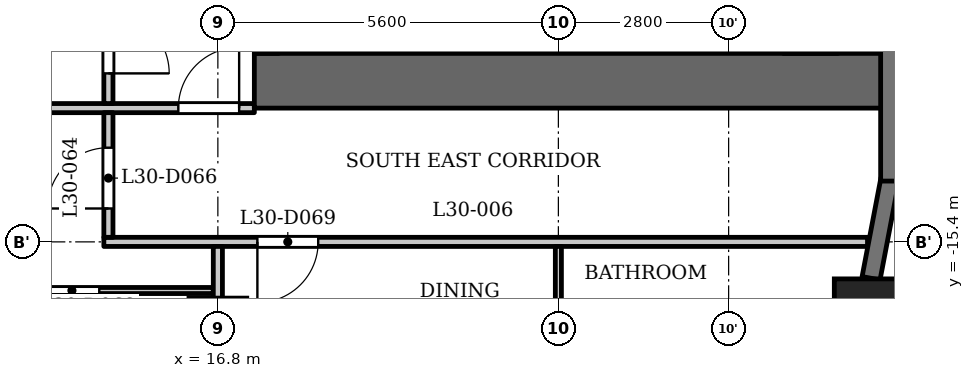
"""IFC4 building model, lengths in metres.
Left out: names, types, materials, properties, quantities, classifications, styles, units other than length and angle.
Written with IfcOpenShell. Run it as: python <this file> out.ifc"""

import sys

from ifc_helpers import new_model, si_unit, direction, frame, frame_2d, origin, origin_2d, place, context, subcontext, project, spatial, rectangle, extrude, element, fill, save


model = new_model("IFC4")
c1 = context("Model", 3, precision=1e-05, world=origin(), true_north=direction((0.0, 1.0)))
c2 = subcontext(c1, "Body", "Model", "MODEL_VIEW")
j1 = project(units=[si_unit("LENGTHUNIT", "METRE"), si_unit("PLANEANGLEUNIT", "RADIAN")], contexts=[c1])
p1 = place(None, origin())
s1 = spatial("IfcSite", under=j1, at=p1, CompositionType="ELEMENT")
p2 = place(p1, origin())
s2 = spatial("IfcBuilding", under=s1, at=p2, CompositionType="ELEMENT")
p3 = place(p2, frame((0.0, 0.0, 118.3)))
s3 = spatial("IfcBuildingStorey", under=s2, at=p3, CompositionType="ELEMENT", Elevation=118.3)
p4 = place(p3, frame((27.538, -16.609, 0.0), z_axis=(0.0, 0.0, 1.0), x_axis=(1.0, 0.0, 0.0)))
e1 = element("IfcColumn", 1, at=p4, inside=s3, PredefinedType="COLUMN", context=c2, shape_type="SweptSolid", body=[
    extrude(rectangle(XDim=1.2, YDim=1.2, at=origin_2d()), origin(), (0.0, 0.0, 1.0), 3.5),
])
p5 = place(p3, frame((16.8, -16.8, 0.0), z_axis=(0.0, 0.0, 1.0), x_axis=(1.0, 0.0, 0.0)))
e2 = element("IfcColumn", 2, at=p5, inside=s3, PredefinedType="COLUMN", context=c2, shape_type="SweptSolid", body=[
    extrude(rectangle(XDim=0.95, YDim=0.95, at=origin_2d()), origin(), (0.0, 0.0, 1.0), 3.5),
])
p6 = place(p3, frame((27.542, -15.999, 0.0), z_axis=(0.0, 0.0, 1.0), x_axis=(0.187349172861, 0.982293381546, 0.0)))
e3 = element("IfcWall", 3, at=p6, inside=s3, PredefinedType="SOLIDWALL", context=c2, shape_type="SweptSolid", body=[
    extrude(rectangle(XDim=1.656, YDim=0.3, at=frame_2d((0.828, 0.0))), origin(), (0.0, 0.0, 1.0), 2.4),
])
p7 = place(p3, frame((27.85, -14.4, 0.0), z_axis=(0.0, 0.0, 1.0), x_axis=(0.0, 1.0, 0.0)))
e4 = element("IfcWall", 4, at=p7, inside=s3, PredefinedType="SOLIDWALL", context=c2, shape_type="SweptSolid", body=[
    extrude(rectangle(XDim=2.6, YDim=0.3, at=frame_2d((1.3, 0.0))), origin(), (0.0, 0.0, 1.0), 2.4),
])
p8 = place(p3, frame((17.4, -12.75, 0.0), z_axis=(0.0, 0.0, 1.0), x_axis=(1.0, 0.0, 0.0)))
e5 = element("IfcWall", 5, at=p8, inside=s3, PredefinedType="SHEAR", context=c2, shape_type="SweptSolid", body=[
    extrude(rectangle(XDim=10.4, YDim=0.9, at=frame_2d((5.2, 0.0))), origin(), (0.0, 0.0, 1.0), 3.2),
])
p9 = place(p3, frame((17.6, -12.3, 0.0), z_axis=(0.0, 0.0, 1.0), x_axis=(0.0, 1.0, 0.0)))
e6 = element("IfcWall", 6, at=p9, inside=s3, PredefinedType="SHEAR", context=c2, shape_type="SweptSolid", body=[
    extrude(rectangle(XDim=24.6, YDim=0.4, at=frame_2d((12.3, 0.0))), origin(), (0.0, 0.0, 1.0), 3.2),
])
p10 = place(p9, frame((6.0, 0.0, 0.0)))
e7 = element("IfcOpeningElement", 7, at=p10, cuts=e6, PredefinedType="OPENING", context=c2, shape_type="SweptSolid", body=[
    extrude(rectangle(XDim=1.1, YDim=2.1, at=frame_2d((0.55, 1.05))), frame((0.0, 0.21, 0.0), z_axis=(0.0, -1.0, 0.0), x_axis=(1.0, 0.0, 0.0)), (0.0, 0.0, 1.0), 0.42),
])
p11 = place(p9, frame((8.4, 0.0, 0.0)))
e8 = element("IfcOpeningElement", 8, at=p11, cuts=e6, PredefinedType="OPENING", context=c2, shape_type="SweptSolid", body=[
    extrude(rectangle(XDim=1.1, YDim=2.1, at=frame_2d((0.55, 1.05))), frame((0.0, 0.21, 0.0), z_axis=(0.0, -1.0, 0.0), x_axis=(1.0, 0.0, 0.0)), (0.0, 0.0, 1.0), 0.42),
])
p12 = place(p9, frame((10.8, 0.0, 0.0)))
e9 = element("IfcOpeningElement", 9, at=p12, cuts=e6, PredefinedType="OPENING", context=c2, shape_type="SweptSolid", body=[
    extrude(rectangle(XDim=1.1, YDim=2.1, at=frame_2d((0.55, 1.05))), frame((0.0, 0.21, 0.0), z_axis=(0.0, -1.0, 0.0), x_axis=(1.0, 0.0, 0.0)), (0.0, 0.0, 1.0), 0.42),
])
p13 = place(p9, frame((16.75, 0.0, 0.0)))
e10 = element("IfcOpeningElement", 10, at=p13, cuts=e6, PredefinedType="OPENING", context=c2, shape_type="SweptSolid", body=[
    extrude(rectangle(XDim=0.9, YDim=2.1, at=frame_2d((0.45, 1.05))), frame((0.0, 0.21, 0.0), z_axis=(0.0, -1.0, 0.0), x_axis=(1.0, 0.0, 0.0)), (0.0, 0.0, 1.0), 0.42),
])
p14 = place(p9, frame((22.8, 0.0, 0.0)))
e11 = element("IfcOpeningElement", 11, at=p14, cuts=e6, PredefinedType="OPENING", context=c2, shape_type="SweptSolid", body=[
    extrude(rectangle(XDim=1.1, YDim=2.1, at=frame_2d((0.55, 1.05))), frame((0.0, 0.21, 0.0), z_axis=(0.0, -1.0, 0.0), x_axis=(1.0, 0.0, 0.0)), (0.0, 0.0, 1.0), 0.42),
])
p15 = place(p9, frame((0.7, 0.0, 0.0)))
e12 = element("IfcOpeningElement", 12, at=p15, cuts=e6, PredefinedType="OPENING", context=c2, shape_type="SweptSolid", body=[
    extrude(rectangle(XDim=1.1, YDim=2.1, at=frame_2d((0.55, 1.05))), frame((0.0, 0.21, 0.0), z_axis=(0.0, -1.0, 0.0), x_axis=(1.0, 0.0, 0.0)), (0.0, 0.0, 1.0), 0.42),
])
p16 = place(p9, frame((12.775, 0.0, 0.0)))
e13 = element("IfcOpeningElement", 13, at=p16, cuts=e6, PredefinedType="OPENING", context=c2, shape_type="SweptSolid", body=[
    extrude(rectangle(XDim=1.8, YDim=2.1, at=frame_2d((0.9, 1.05))), frame((0.0, 0.21, 0.0), z_axis=(0.0, -1.0, 0.0), x_axis=(1.0, 0.0, 0.0)), (0.0, 0.0, 1.0), 0.42),
])
p17 = place(p3, frame((26.55, -12.3, 0.0), z_axis=(0.0, 0.0, 1.0), x_axis=(0.0, 1.0, 0.0)))
e14 = element("IfcWall", 14, at=p17, inside=s3, PredefinedType="SHEAR", context=c2, shape_type="SweptSolid", body=[
    extrude(rectangle(XDim=24.6, YDim=0.9, at=frame_2d((12.3, 0.0))), origin(), (0.0, 0.0, 1.0), 3.2),
])
p18 = place(p3, frame((23.55, -12.3, 0.0), z_axis=(0.0, 0.0, 1.0), x_axis=(0.0, 1.0, 0.0)))
e15 = element("IfcWall", 15, at=p18, inside=s3, PredefinedType="PARTITIONING", context=c2, shape_type="SweptSolid", body=[
    extrude(rectangle(XDim=2.5, YDim=0.2, at=frame_2d((1.25, 0.0))), origin(), (0.0, 0.0, 1.0), 3.2),
])
p19 = place(p18, frame((0.8, 0.0, 0.0)))
e16 = element("IfcOpeningElement", 16, at=p19, cuts=e15, PredefinedType="OPENING", context=c2, shape_type="SweptSolid", body=[
    extrude(rectangle(XDim=0.9, YDim=2.1, at=frame_2d((0.45, 1.05))), frame((0.0, 0.11, 0.0), z_axis=(0.0, -1.0, 0.0), x_axis=(1.0, 0.0, 0.0)), (0.0, 0.0, 1.0), 0.22),
])
p20 = place(p3, frame((-16.725, -16.2, 0.0), z_axis=(0.0, 0.0, 1.0), x_axis=(1.0, 0.0, 0.0)))
e17 = element("IfcWall", 17, at=p20, inside=s3, PredefinedType="PARTITIONING", context=c2, shape_type="SweptSolid", body=[
    extrude(rectangle(XDim=33.45, YDim=0.1, at=frame_2d((16.725, 0.0))), origin(), (0.0, 0.0, 1.0), 3.2),
])
p21 = place(p20, frame((4.075, 0.0, 0.0)))
e18 = element("IfcOpeningElement", 18, at=p21, cuts=e17, PredefinedType="OPENING", context=c2, shape_type="SweptSolid", body=[
    extrude(rectangle(XDim=0.8, YDim=2.1, at=frame_2d((0.4, 1.05))), frame((0.0, 0.06, 0.0), z_axis=(0.0, -1.0, 0.0), x_axis=(1.0, 0.0, 0.0)), (0.0, 0.0, 1.0), 0.12),
])
p22 = place(p20, frame((9.425, 0.0, 0.0)))
e19 = element("IfcOpeningElement", 19, at=p22, cuts=e17, PredefinedType="OPENING", context=c2, shape_type="SweptSolid", body=[
    extrude(rectangle(XDim=0.9, YDim=2.1, at=frame_2d((0.45, 1.05))), frame((0.0, 0.06, 0.0), z_axis=(0.0, -1.0, 0.0), x_axis=(1.0, 0.0, 0.0)), (0.0, 0.0, 1.0), 0.12),
])
p23 = place(p20, frame((19.875, 0.0, 0.0)))
e20 = element("IfcOpeningElement", 20, at=p23, cuts=e17, PredefinedType="OPENING", context=c2, shape_type="SweptSolid", body=[
    extrude(rectangle(XDim=0.8, YDim=2.1, at=frame_2d((0.4, 1.05))), frame((0.0, 0.06, 0.0), z_axis=(0.0, -1.0, 0.0), x_axis=(1.0, 0.0, 0.0)), (0.0, 0.0, 1.0), 0.12),
])
p24 = place(p20, frame((17.375, 0.0, 0.0)))
e21 = element("IfcOpeningElement", 21, at=p24, cuts=e17, PredefinedType="OPENING", context=c2, shape_type="SweptSolid", body=[
    extrude(rectangle(XDim=0.9, YDim=2.1, at=frame_2d((0.45, 1.05))), frame((0.0, 0.06, 0.0), z_axis=(0.0, -1.0, 0.0), x_axis=(1.0, 0.0, 0.0)), (0.0, 0.0, 1.0), 0.12),
])
p25 = place(p20, frame((12.525, 0.0, 0.0)))
e22 = element("IfcOpeningElement", 22, at=p25, cuts=e17, PredefinedType="OPENING", context=c2, shape_type="SweptSolid", body=[
    extrude(rectangle(XDim=0.9, YDim=2.1, at=frame_2d((0.45, 1.05))), frame((0.0, 0.06, 0.0), z_axis=(0.0, -1.0, 0.0), x_axis=(1.0, 0.0, 0.0)), (0.0, 0.0, 1.0), 0.12),
])
p26 = place(p20, frame((14.775, 0.0, 0.0)))
e23 = element("IfcOpeningElement", 23, at=p26, cuts=e17, PredefinedType="OPENING", context=c2, shape_type="SweptSolid", body=[
    extrude(rectangle(XDim=0.9, YDim=2.1, at=frame_2d((0.45, 1.05))), frame((0.0, 0.06, 0.0), z_axis=(0.0, -1.0, 0.0), x_axis=(1.0, 0.0, 0.0)), (0.0, 0.0, 1.0), 0.12),
])
p27 = place(p20, frame((26.475, 0.0, 0.0)))
e24 = element("IfcOpeningElement", 24, at=p27, cuts=e17, PredefinedType="OPENING", context=c2, shape_type="SweptSolid", body=[
    extrude(rectangle(XDim=0.8, YDim=2.1, at=frame_2d((0.4, 1.05))), frame((0.0, 0.06, 0.0), z_axis=(0.0, -1.0, 0.0), x_axis=(1.0, 0.0, 0.0)), (0.0, 0.0, 1.0), 0.12),
])
p28 = place(p20, frame((23.725, 0.0, 0.0)))
e25 = element("IfcOpeningElement", 25, at=p28, cuts=e17, PredefinedType="OPENING", context=c2, shape_type="SweptSolid", body=[
    extrude(rectangle(XDim=0.9, YDim=2.1, at=frame_2d((0.45, 1.05))), frame((0.0, 0.06, 0.0), z_axis=(0.0, -1.0, 0.0), x_axis=(1.0, 0.0, 0.0)), (0.0, 0.0, 1.0), 0.12),
])
p29 = place(p20, frame((29.075, 0.0, 0.0)))
e26 = element("IfcOpeningElement", 26, at=p29, cuts=e17, PredefinedType="OPENING", context=c2, shape_type="SweptSolid", body=[
    extrude(rectangle(XDim=0.8, YDim=2.1, at=frame_2d((0.4, 1.05))), frame((0.0, 0.06, 0.0), z_axis=(0.0, -1.0, 0.0), x_axis=(1.0, 0.0, 0.0)), (0.0, 0.0, 1.0), 0.12),
])
p30 = place(p20, frame((30.675, 0.0, 0.0)))
e27 = element("IfcOpeningElement", 27, at=p30, cuts=e17, PredefinedType="OPENING", context=c2, shape_type="SweptSolid", body=[
    extrude(rectangle(XDim=0.9, YDim=2.1, at=frame_2d((0.45, 1.05))), frame((0.0, 0.06, 0.0), z_axis=(0.0, -1.0, 0.0), x_axis=(1.0, 0.0, 0.0)), (0.0, 0.0, 1.0), 0.12),
])
p31 = place(p3, frame((14.925, -15.4, 0.0), z_axis=(0.0, 0.0, 1.0), x_axis=(1.0, 0.0, 0.0)))
e28 = element("IfcWall", 28, at=p31, inside=s3, PredefinedType="PARTITIONING", context=c2, shape_type="SweptSolid", body=[
    extrude(rectangle(XDim=12.559, YDim=0.15, at=frame_2d((6.279, 0.0))), origin(), (0.0, 0.0, 1.0), 3.2),
])
p32 = place(p31, frame((2.525, 0.0, 0.0)))
e29 = element("IfcOpeningElement", 29, at=p32, cuts=e28, PredefinedType="OPENING", context=c2, shape_type="SweptSolid", body=[
    extrude(rectangle(XDim=1.0, YDim=2.1, at=frame_2d((0.5, 1.05))), frame((0.0, 0.085, 0.0), z_axis=(0.0, -1.0, 0.0), x_axis=(1.0, 0.0, 0.0)), (0.0, 0.0, 1.0), 0.17),
])
p33 = place(p3, frame((-17.4, -13.2, 0.0), z_axis=(0.0, 0.0, 1.0), x_axis=(1.0, 0.0, 0.0)))
e30 = element("IfcWall", 30, at=p33, inside=s3, PredefinedType="PARTITIONING", context=c2, shape_type="SweptSolid", body=[
    extrude(rectangle(XDim=34.8, YDim=0.15, at=frame_2d((17.4, 0.0))), origin(), (0.0, 0.0, 1.0), 3.2),
])
p34 = place(p33, frame((0.15, 0.0, 0.0)))
e31 = element("IfcOpeningElement", 31, at=p34, cuts=e30, PredefinedType="OPENING", context=c2, shape_type="SweptSolid", body=[
    extrude(rectangle(XDim=1.0, YDim=2.1, at=frame_2d((0.5, 1.05))), frame((0.0, 0.085, 0.0), z_axis=(0.0, -1.0, 0.0), x_axis=(1.0, 0.0, 0.0)), (0.0, 0.0, 1.0), 0.17),
])
p35 = place(p33, frame((33.55, 0.0, 0.0)))
e32 = element("IfcOpeningElement", 32, at=p35, cuts=e30, PredefinedType="OPENING", context=c2, shape_type="SweptSolid", body=[
    extrude(rectangle(XDim=1.0, YDim=2.1, at=frame_2d((0.5, 1.05))), frame((0.0, 0.085, 0.0), z_axis=(0.0, -1.0, 0.0), x_axis=(1.0, 0.0, 0.0)), (0.0, 0.0, 1.0), 0.17),
])
p36 = place(p33, frame((10.1, 0.0, 0.0)))
e33 = element("IfcOpeningElement", 33, at=p36, cuts=e30, PredefinedType="OPENING", context=c2, shape_type="SweptSolid", body=[
    extrude(rectangle(XDim=1.0, YDim=2.1, at=frame_2d((0.5, 1.05))), frame((0.0, 0.085, 0.0), z_axis=(0.0, -1.0, 0.0), x_axis=(1.0, 0.0, 0.0)), (0.0, 0.0, 1.0), 0.17),
])
p37 = place(p33, frame((15.7, 0.0, 0.0)))
e34 = element("IfcOpeningElement", 34, at=p37, cuts=e30, PredefinedType="OPENING", context=c2, shape_type="SweptSolid", body=[
    extrude(rectangle(XDim=1.0, YDim=2.1, at=frame_2d((0.5, 1.05))), frame((0.0, 0.085, 0.0), z_axis=(0.0, -1.0, 0.0), x_axis=(1.0, 0.0, 0.0)), (0.0, 0.0, 1.0), 0.17),
])
p38 = place(p33, frame((24.9, 0.0, 0.0)))
e35 = element("IfcOpeningElement", 35, at=p38, cuts=e30, PredefinedType="OPENING", context=c2, shape_type="SweptSolid", body=[
    extrude(rectangle(XDim=1.0, YDim=2.1, at=frame_2d((0.5, 1.05))), frame((0.0, 0.085, 0.0), z_axis=(0.0, -1.0, 0.0), x_axis=(1.0, 0.0, 0.0)), (0.0, 0.0, 1.0), 0.17),
])
p39 = place(p3, frame((15.0, -15.325, 0.0), z_axis=(0.0, 0.0, 1.0), x_axis=(0.0, 1.0, 0.0)))
e36 = element("IfcWall", 36, at=p39, inside=s3, PredefinedType="PARTITIONING", context=c2, shape_type="SweptSolid", body=[
    extrude(rectangle(XDim=2.05, YDim=0.15, at=frame_2d((1.025, 0.0))), origin(), (0.0, 0.0, 1.0), 3.2),
])
p40 = place(p39, frame((0.474, 0.0, 0.0)))
e37 = element("IfcOpeningElement", 37, at=p40, cuts=e36, PredefinedType="OPENING", context=c2, shape_type="SweptSolid", body=[
    extrude(rectangle(XDim=1.0, YDim=2.1, at=frame_2d((0.5, 1.05))), frame((0.0, 0.085, 0.0), z_axis=(0.0, -1.0, 0.0), x_axis=(1.0, 0.0, 0.0)), (0.0, 0.0, 1.0), 0.17),
])
p41 = place(p3, frame((15.0, -13.125, 0.0), z_axis=(0.0, 0.0, 1.0), x_axis=(0.0, 1.0, 0.0)))
e38 = element("IfcWall", 38, at=p41, inside=s3, PredefinedType="PARTITIONING", context=c2, shape_type="SweptSolid", body=[
    extrude(rectangle(XDim=6.356, YDim=0.15, at=frame_2d((3.178, 0.0))), origin(), (0.0, 0.0, 1.0), 3.2),
])
p42 = place(p41, frame((0.496, 0.0, 0.0)))
e39 = element("IfcOpeningElement", 39, at=p42, cuts=e38, PredefinedType="OPENING", context=c2, shape_type="SweptSolid", body=[
    extrude(rectangle(XDim=1.0, YDim=2.1, at=frame_2d((0.5, 1.05))), frame((0.0, 0.085, 0.0), z_axis=(0.0, -1.0, 0.0), x_axis=(1.0, 0.0, 0.0)), (0.0, 0.0, 1.0), 0.17),
])
p43 = place(p3, frame((16.8, -22.98, 0.0), z_axis=(0.0, 0.0, 1.0), x_axis=(0.0, 1.0, 0.0)))
e40 = element("IfcWall", 40, at=p43, inside=s3, PredefinedType="PARTITIONING", context=c2, shape_type="SweptSolid", body=[
    extrude(rectangle(XDim=7.505, YDim=0.15, at=frame_2d((3.752, 0.0))), origin(), (0.0, 0.0, 1.0), 3.2),
])
p44 = place(p3, frame((22.4, -17.75, 0.0), z_axis=(0.0, 0.0, 1.0), x_axis=(0.0, 1.0, 0.0)))
e41 = element("IfcWall", 41, at=p44, inside=s3, PredefinedType="PARTITIONING", context=c2, shape_type="SweptSolid", body=[
    extrude(rectangle(XDim=2.275, YDim=0.1, at=frame_2d((1.137, 0.0))), origin(), (0.0, 0.0, 1.0), 3.2),
])
p45 = place(p42, origin())
e42 = element("IfcDoor", 42, at=p45, inside=s3, OperationType="SINGLE_SWING_LEFT", PredefinedType="DOOR", context=c2, shape_type="SweptSolid", body=[
    extrude(rectangle(XDim=1.0, YDim=2.1, at=frame_2d((0.5, 1.05))), frame((0.0, 0.025, 0.0), z_axis=(0.0, -1.0, 0.0), x_axis=(1.0, 0.0, 0.0)), (0.0, 0.0, 1.0), 0.05),
])
fill(e39, e42)
p46 = place(p35, origin())
e43 = element("IfcDoor", 43, at=p46, inside=s3, OperationType="SINGLE_SWING_LEFT", PredefinedType="DOOR", context=c2, shape_type="SweptSolid", body=[
    extrude(rectangle(XDim=1.0, YDim=2.1, at=frame_2d((0.5, 1.05))), frame((0.0, 0.025, 0.0), z_axis=(0.0, -1.0, 0.0), x_axis=(1.0, 0.0, 0.0)), (0.0, 0.0, 1.0), 0.05),
])
fill(e32, e43)
p47 = place(p40, origin())
e44 = element("IfcDoor", 44, at=p47, inside=s3, OperationType="SINGLE_SWING_RIGHT", PredefinedType="DOOR", context=c2, shape_type="SweptSolid", body=[
    extrude(rectangle(XDim=1.0, YDim=2.1, at=frame_2d((0.5, 1.05))), frame((0.0, 0.025, 0.0), z_axis=(0.0, -1.0, 0.0), x_axis=(1.0, 0.0, 0.0)), (0.0, 0.0, 1.0), 0.05),
])
fill(e37, e44)
p48 = place(p30, origin())
e45 = element("IfcDoor", 45, at=p48, inside=s3, OperationType="SINGLE_SWING_LEFT", PredefinedType="DOOR", context=c2, shape_type="SweptSolid", body=[
    extrude(rectangle(XDim=0.9, YDim=2.1, at=frame_2d((0.45, 1.05))), frame((0.0, 0.025, 0.0), z_axis=(0.0, -1.0, 0.0), x_axis=(1.0, 0.0, 0.0)), (0.0, 0.0, 1.0), 0.05),
])
fill(e27, e45)
p49 = place(p32, origin())
e46 = element("IfcDoor", 46, at=p49, inside=s3, OperationType="SINGLE_SWING_LEFT", PredefinedType="DOOR", context=c2, shape_type="SweptSolid", body=[
    extrude(rectangle(XDim=1.0, YDim=2.1, at=frame_2d((0.5, 1.05))), frame((0.0, 0.025, 0.0), z_axis=(0.0, -1.0, 0.0), x_axis=(1.0, 0.0, 0.0)), (0.0, 0.0, 1.0), 0.05),
])
fill(e29, e46)
save(model, sys.argv[1])
